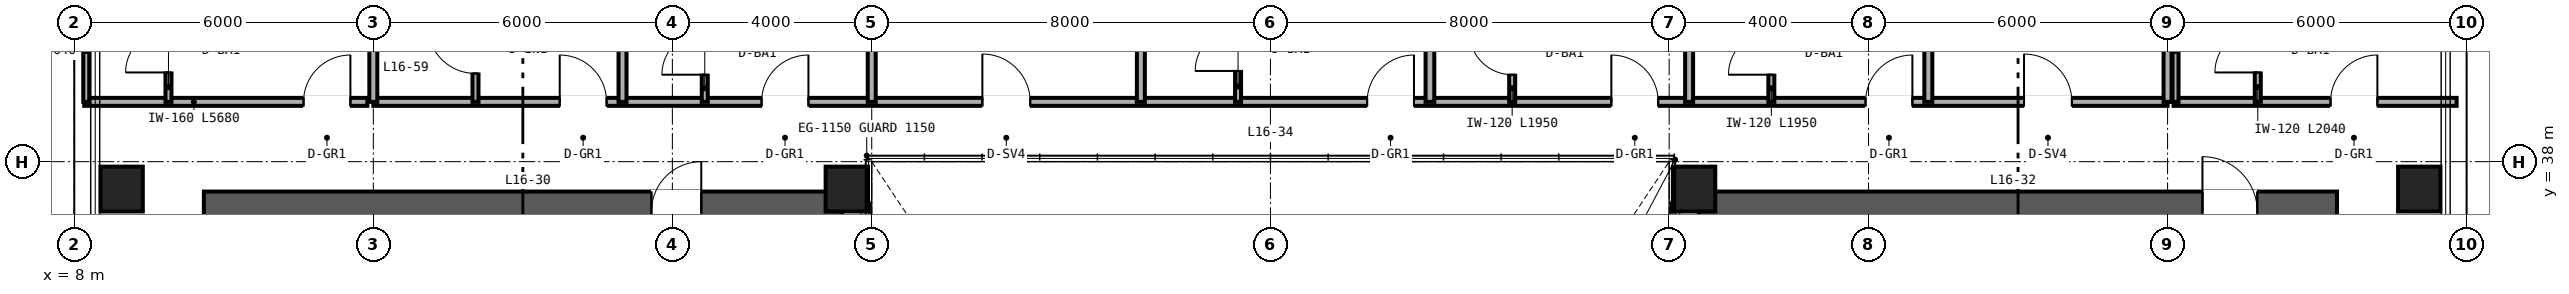
"""IFC4 building model, lengths in metres.
Left out: names, types, materials, properties, quantities, classifications, styles, units other than length and angle.
Written with IfcOpenShell. Run it as: python <this file> out.ifc"""

import sys

from ifc_helpers import new_model, si_unit, direction, frame, frame_2d, origin, origin_2d, place, context, subcontext, project, spatial, rectangle, hollow_rectangle, extrude, source, transform, mapped, element, fill, save


model = new_model("IFC4")
c1 = context("Model", 3, precision=1e-05, world=origin(), true_north=direction((0.0, 1.0)))
c2 = subcontext(c1, "Body", "Model", "MODEL_VIEW")
j1 = project(units=[si_unit("LENGTHUNIT", "METRE"), si_unit("PLANEANGLEUNIT", "RADIAN")], contexts=[c1])
p1 = place(None, origin())
s1 = spatial("IfcSite", under=j1, at=p1, CompositionType="ELEMENT")
p2 = place(p1, origin())
s2 = spatial("IfcBuilding", under=s1, at=p2, CompositionType="ELEMENT")
p3 = place(p2, frame((0.0, 0.0, 67.2)))
s3 = spatial("IfcBuildingStorey", under=s2, at=p3, CompositionType="ELEMENT", Elevation=67.2)
p4 = place(p3, frame((10.6, 37.0, 0.0), z_axis=(0.0, 0.0, 1.0), x_axis=(1.0, 0.0, 0.0)))
e1 = element("IfcWall", 1, at=p4, inside=s3, PredefinedType="SHEAR", context=c2, shape_type="SweptSolid", body=[
    extrude(rectangle(XDim=12.8, YDim=0.8, at=frame_2d((6.4, 0.0))), origin(), (0.0, 0.0, 1.0), 3.35),
])
p5 = place(p4, frame((8.98, 0.0, 0.0)))
e2 = element("IfcOpeningElement", 2, at=p5, cuts=e1, PredefinedType="OPENING", context=c2, shape_type="SweptSolid", body=[
    extrude(rectangle(XDim=1.0, YDim=2.15, at=frame_2d((0.5, 1.075))), frame((0.0, 0.41, 0.0), z_axis=(0.0, -1.0, 0.0), x_axis=(1.0, 0.0, 0.0)), (0.0, 0.0, 1.0), 0.82),
])
p6 = place(p3, frame((40.6, 37.0, 0.0), z_axis=(0.0, 0.0, 1.0), x_axis=(1.0, 0.0, 0.0)))
e3 = element("IfcWall", 3, at=p6, inside=s3, PredefinedType="SHEAR", context=c2, shape_type="SweptSolid", body=[
    extrude(rectangle(XDim=12.8, YDim=0.8, at=frame_2d((6.4, 0.0))), origin(), (0.0, 0.0, 1.0), 3.35),
])
p7 = place(p6, frame((10.1, 0.0, 0.0)))
e4 = element("IfcOpeningElement", 4, at=p7, cuts=e3, PredefinedType="OPENING", context=c2, shape_type="SweptSolid", body=[
    extrude(rectangle(XDim=1.1, YDim=2.15, at=frame_2d((0.55, 1.075))), frame((0.0, 0.41, 0.0), z_axis=(0.0, -1.0, 0.0), x_axis=(1.0, 0.0, 0.0)), (0.0, 0.0, 1.0), 0.82),
])
m1 = source(origin(), c2, "Body", "SweptSolid", [
    extrude(hollow_rectangle(XDim=0.85, YDim=0.9, WallThickness=0.04, at=origin_2d()), origin(), (0.0, 0.0, 1.0), 3.35),
])
for number, where, z_axis, x_axis in (
    (5, (8.95, 37.45, 0.0), (0.0, 0.0, 1.0), (1.0, 0.0, 0.0)),
    (6, (23.5, 37.45, 0.0), (0.0, 0.0, 1.0), (1.0, 0.0, 0.0)),
    (7, (40.5, 37.45, 0.0), (0.0, 0.0, 1.0), (1.0, 0.0, 0.0)),
    (8, (55.05, 37.45, 0.0), (0.0, 0.0, 1.0), (1.0, 0.0, 0.0)),
):
    element("IfcColumn", number, at=place(p3, frame(where, z_axis=z_axis, x_axis=x_axis)), inside=s3, PredefinedType="COLUMN", context=c2, shape_type="MappedRepresentation", body=[
        mapped(m1, transform((0.0, 0.0, 0.0), scale=1.0)),
    ])
p8 = place(p3, frame((8.2, 39.2, 0.0), z_axis=(0.0, 0.0, 1.0), x_axis=(1.0, 0.0, 0.0)))
e9 = element("IfcWall", 9, at=p8, inside=s3, PredefinedType="PARTITIONING", context=c2, shape_type="SweptSolid", body=[
    extrude(rectangle(XDim=5.68, YDim=0.16, at=frame_2d((2.84, 0.0))), origin(), (0.0, 0.0, 1.0), 3.35),
])
p9 = place(p8, frame((4.4, 0.0, 0.0)))
e10 = element("IfcOpeningElement", 10, at=p9, cuts=e9, PredefinedType="OPENING", context=c2, shape_type="SweptSolid", body=[
    extrude(rectangle(XDim=0.94, YDim=2.15, at=frame_2d((0.47, 1.075))), frame((0.0, 0.09, 0.0), z_axis=(0.0, -1.0, 0.0), x_axis=(1.0, 0.0, 0.0)), (0.0, 0.0, 1.0), 0.18),
])
p10 = place(p3, frame((9.89, 39.2, 0.0), z_axis=(0.0, 0.0, 1.0), x_axis=(0.0, 1.0, 0.0)))
e11 = element("IfcWall", 11, at=p10, inside=s3, PredefinedType="PARTITIONING", context=c2, shape_type="SweptSolid", body=[
    extrude(rectangle(XDim=2.04, YDim=0.12, at=frame_2d((1.02, 0.0))), origin(), (0.0, 0.0, 1.0), 3.35),
])
p11 = place(p10, frame((0.59, 0.0, 0.0)))
e12 = element("IfcOpeningElement", 12, at=p11, cuts=e11, PredefinedType="OPENING", context=c2, shape_type="SweptSolid", body=[
    extrude(rectangle(XDim=0.86, YDim=2.1, at=frame_2d((0.43, 1.05))), frame((0.0, 0.07, 0.0), z_axis=(0.0, -1.0, 0.0), x_axis=(1.0, 0.0, 0.0)), (0.0, 0.0, 1.0), 0.14),
])
p12 = place(p3, frame((8.24, 39.2, 0.0), z_axis=(0.0, 0.0, 1.0), x_axis=(0.0, 1.0, 0.0)))
e13 = element("IfcWall", 13, at=p12, inside=s3, PredefinedType="PARTITIONING", context=c2, shape_type="SweptSolid", body=[
    extrude(rectangle(XDim=2.04, YDim=0.12, at=frame_2d((1.02, 0.0))), origin(), (0.0, 0.0, 1.0), 3.35),
])
p13 = place(p3, frame((50.12, 39.2, 0.0), z_axis=(0.0, 0.0, 1.0), x_axis=(1.0, 0.0, 0.0)))
e14 = element("IfcWall", 14, at=p13, inside=s3, PredefinedType="PARTITIONING", context=c2, shape_type="SweptSolid", body=[
    extrude(rectangle(XDim=5.68, YDim=0.16, at=frame_2d((2.84, 0.0))), origin(), (0.0, 0.0, 1.0), 3.35),
])
p14 = place(p13, frame((3.15, 0.0, 0.0)))
e15 = element("IfcOpeningElement", 15, at=p14, cuts=e14, PredefinedType="OPENING", context=c2, shape_type="SweptSolid", body=[
    extrude(rectangle(XDim=0.94, YDim=2.15, at=frame_2d((0.47, 1.075))), frame((0.0, 0.09, 0.0), z_axis=(0.0, -1.0, 0.0), x_axis=(1.0, 0.0, 0.0)), (0.0, 0.0, 1.0), 0.18),
])
p15 = place(p3, frame((51.81, 39.2, 0.0), z_axis=(0.0, 0.0, 1.0), x_axis=(0.0, 1.0, 0.0)))
e16 = element("IfcWall", 16, at=p15, inside=s3, PredefinedType="PARTITIONING", context=c2, shape_type="SweptSolid", body=[
    extrude(rectangle(XDim=2.04, YDim=0.12, at=frame_2d((1.02, 0.0))), origin(), (0.0, 0.0, 1.0), 3.35),
])
p16 = place(p15, frame((0.59, 0.0, 0.0)))
e17 = element("IfcOpeningElement", 17, at=p16, cuts=e16, PredefinedType="OPENING", context=c2, shape_type="SweptSolid", body=[
    extrude(rectangle(XDim=0.86, YDim=2.1, at=frame_2d((0.43, 1.05))), frame((0.0, 0.07, 0.0), z_axis=(0.0, -1.0, 0.0), x_axis=(1.0, 0.0, 0.0)), (0.0, 0.0, 1.0), 0.14),
])
p17 = place(p3, frame((50.16, 39.2, 0.0), z_axis=(0.0, 0.0, 1.0), x_axis=(0.0, 1.0, 0.0)))
e18 = element("IfcWall", 18, at=p17, inside=s3, PredefinedType="PARTITIONING", context=c2, shape_type="SweptSolid", body=[
    extrude(rectangle(XDim=2.04, YDim=0.12, at=frame_2d((1.02, 0.0))), origin(), (0.0, 0.0, 1.0), 3.35),
])
p18 = place(p3, frame((14.0, 39.2, 0.0), z_axis=(0.0, 0.0, 1.0), x_axis=(1.0, 0.0, 0.0)))
e19 = element("IfcWall", 19, at=p18, inside=s3, PredefinedType="PARTITIONING", context=c2, shape_type="SweptSolid", body=[
    extrude(rectangle(XDim=36.0, YDim=0.16, at=frame_2d((18.0, 0.0))), origin(), (0.0, 0.0, 1.0), 2.571),
])
p19 = place(p18, frame((3.74, 0.0, 0.0)))
e20 = element("IfcOpeningElement", 20, at=p19, cuts=e19, PredefinedType="OPENING", context=c2, shape_type="SweptSolid", body=[
    extrude(rectangle(XDim=0.94, YDim=2.15, at=frame_2d((0.47, 1.075))), frame((0.0, 0.09, 0.0), z_axis=(0.0, -1.0, 0.0), x_axis=(1.0, 0.0, 0.0)), (0.0, 0.0, 1.0), 0.18),
])
p20 = place(p18, frame((7.79, 0.0, 0.0)))
e21 = element("IfcOpeningElement", 21, at=p20, cuts=e19, PredefinedType="OPENING", context=c2, shape_type="SweptSolid", body=[
    extrude(rectangle(XDim=0.94, YDim=2.15, at=frame_2d((0.47, 1.075))), frame((0.0, 0.09, 0.0), z_axis=(0.0, -1.0, 0.0), x_axis=(1.0, 0.0, 0.0)), (0.0, 0.0, 1.0), 0.18),
])
p21 = place(p18, frame((12.22, 0.0, 0.0)))
e22 = element("IfcOpeningElement", 22, at=p21, cuts=e19, PredefinedType="OPENING", context=c2, shape_type="SweptSolid", body=[
    extrude(rectangle(XDim=0.96, YDim=2.15, at=frame_2d((0.48, 1.075))), frame((0.0, 0.09, 0.0), z_axis=(0.0, -1.0, 0.0), x_axis=(1.0, 0.0, 0.0)), (0.0, 0.0, 1.0), 0.18),
])
p22 = place(p18, frame((19.94, 0.0, 0.0)))
e23 = element("IfcOpeningElement", 23, at=p22, cuts=e19, PredefinedType="OPENING", context=c2, shape_type="SweptSolid", body=[
    extrude(rectangle(XDim=0.94, YDim=2.15, at=frame_2d((0.47, 1.075))), frame((0.0, 0.09, 0.0), z_axis=(0.0, -1.0, 0.0), x_axis=(1.0, 0.0, 0.0)), (0.0, 0.0, 1.0), 0.18),
])
p23 = place(p18, frame((24.84, 0.0, 0.0)))
e24 = element("IfcOpeningElement", 24, at=p23, cuts=e19, PredefinedType="OPENING", context=c2, shape_type="SweptSolid", body=[
    extrude(rectangle(XDim=0.94, YDim=2.15, at=frame_2d((0.47, 1.075))), frame((0.0, 0.09, 0.0), z_axis=(0.0, -1.0, 0.0), x_axis=(1.0, 0.0, 0.0)), (0.0, 0.0, 1.0), 0.18),
])
p24 = place(p18, frame((29.94, 0.0, 0.0)))
e25 = element("IfcOpeningElement", 25, at=p24, cuts=e19, PredefinedType="OPENING", context=c2, shape_type="SweptSolid", body=[
    extrude(rectangle(XDim=0.94, YDim=2.15, at=frame_2d((0.47, 1.075))), frame((0.0, 0.09, 0.0), z_axis=(0.0, -1.0, 0.0), x_axis=(1.0, 0.0, 0.0)), (0.0, 0.0, 1.0), 0.18),
])
p25 = place(p18, frame((33.12, 0.0, 0.0)))
e26 = element("IfcOpeningElement", 26, at=p25, cuts=e19, PredefinedType="OPENING", context=c2, shape_type="SweptSolid", body=[
    extrude(rectangle(XDim=0.96, YDim=2.15, at=frame_2d((0.48, 1.075))), frame((0.0, 0.09, 0.0), z_axis=(0.0, -1.0, 0.0), x_axis=(1.0, 0.0, 0.0)), (0.0, 0.0, 1.0), 0.18),
])
for number, where, z_axis, x_axis in (
    (27, (14.0, 39.2, 0.0), (0.0, 0.0, 1.0), (0.0, 1.0, 0.0)),
    (28, (50.0, 39.2, 0.0), (0.0, 0.0, 1.0), (0.0, 1.0, 0.0)),
    (29, (19.0, 39.2, 0.0), (0.0, 0.0, 1.0), (0.0, 1.0, 0.0)),
):
    element("IfcWall", number, at=place(p3, frame(where, z_axis=z_axis, x_axis=x_axis)), inside=s3, PredefinedType="PARTITIONING", context=c2, shape_type="SweptSolid", body=[
        extrude(rectangle(XDim=10.44, YDim=0.16, at=frame_2d((5.22, 0.0))), origin(), (0.0, 0.0, 1.0), 2.657),
    ])
p26 = place(p3, frame((16.05, 39.2, 0.0), z_axis=(0.0, 0.0, 1.0), x_axis=(0.0, 1.0, 0.0)))
e30 = element("IfcWall", 30, at=p26, inside=s3, PredefinedType="PARTITIONING", context=c2, shape_type="SweptSolid", body=[
    extrude(rectangle(XDim=2.1, YDim=0.12, at=frame_2d((1.05, 0.0))), origin(), (0.0, 0.0, 1.0), 3.35),
])
p27 = place(p26, frame((0.57, 0.0, 0.0)))
e31 = element("IfcOpeningElement", 31, at=p27, cuts=e30, PredefinedType="OPENING", context=c2, shape_type="SweptSolid", body=[
    extrude(rectangle(XDim=0.96, YDim=2.15, at=frame_2d((0.48, 1.075))), frame((0.0, 0.07, 0.0), z_axis=(0.0, -1.0, 0.0), x_axis=(1.0, 0.0, 0.0)), (0.0, 0.0, 1.0), 0.14),
])
p28 = place(p3, frame((24.0, 39.2, 0.0), z_axis=(0.0, 0.0, 1.0), x_axis=(0.0, 1.0, 0.0)))
e32 = element("IfcWall", 32, at=p28, inside=s3, PredefinedType="PARTITIONING", context=c2, shape_type="SweptSolid", body=[
    extrude(rectangle(XDim=10.44, YDim=0.16, at=frame_2d((5.22, 0.0))), origin(), (0.0, 0.0, 1.0), 2.423),
])
p29 = place(p3, frame((20.65, 39.2, 0.0), z_axis=(0.0, 0.0, 1.0), x_axis=(0.0, 1.0, 0.0)))
e33 = element("IfcWall", 33, at=p29, inside=s3, PredefinedType="PARTITIONING", context=c2, shape_type="SweptSolid", body=[
    extrude(rectangle(XDim=1.95, YDim=0.12, at=frame_2d((0.975, 0.0))), origin(), (0.0, 0.0, 1.0), 3.35),
])
p30 = place(p29, frame((0.545, 0.0, 0.0)))
e34 = element("IfcOpeningElement", 34, at=p30, cuts=e33, PredefinedType="OPENING", context=c2, shape_type="SweptSolid", body=[
    extrude(rectangle(XDim=0.86, YDim=2.1, at=frame_2d((0.43, 1.05))), frame((0.0, 0.07, 0.0), z_axis=(0.0, -1.0, 0.0), x_axis=(1.0, 0.0, 0.0)), (0.0, 0.0, 1.0), 0.14),
])
p31 = place(p3, frame((29.4, 39.2, 0.0), z_axis=(0.0, 0.0, 1.0), x_axis=(0.0, 1.0, 0.0)))
e35 = element("IfcWall", 35, at=p31, inside=s3, PredefinedType="PARTITIONING", context=c2, shape_type="SweptSolid", body=[
    extrude(rectangle(XDim=10.44, YDim=0.16, at=frame_2d((5.22, 0.0))), origin(), (0.0, 0.0, 1.0), 2.423),
])
p32 = place(p3, frame((35.2, 39.2, 0.0), z_axis=(0.0, 0.0, 1.0), x_axis=(0.0, 1.0, 0.0)))
e36 = element("IfcWall", 36, at=p32, inside=s3, PredefinedType="PARTITIONING", context=c2, shape_type="SweptSolid", body=[
    extrude(rectangle(XDim=10.44, YDim=0.175, at=frame_2d((5.22, 0.0))), origin(), (0.0, 0.0, 1.0), 2.423),
])
p33 = place(p3, frame((31.35, 39.2, 0.0), z_axis=(0.0, 0.0, 1.0), x_axis=(0.0, 1.0, 0.0)))
e37 = element("IfcWall", 37, at=p33, inside=s3, PredefinedType="PARTITIONING", context=c2, shape_type="SweptSolid", body=[
    extrude(rectangle(XDim=2.1, YDim=0.12, at=frame_2d((1.05, 0.0))), origin(), (0.0, 0.0, 1.0), 3.35),
])
p34 = place(p33, frame((0.62, 0.0, 0.0)))
e38 = element("IfcOpeningElement", 38, at=p34, cuts=e37, PredefinedType="OPENING", context=c2, shape_type="SweptSolid", body=[
    extrude(rectangle(XDim=0.86, YDim=2.1, at=frame_2d((0.43, 1.05))), frame((0.0, 0.07, 0.0), z_axis=(0.0, -1.0, 0.0), x_axis=(1.0, 0.0, 0.0)), (0.0, 0.0, 1.0), 0.14),
])
p35 = place(p3, frame((40.4, 39.2, 0.0), z_axis=(0.0, 0.0, 1.0), x_axis=(0.0, 1.0, 0.0)))
e39 = element("IfcWall", 39, at=p35, inside=s3, PredefinedType="PARTITIONING", context=c2, shape_type="SweptSolid", body=[
    extrude(rectangle(XDim=10.44, YDim=0.16, at=frame_2d((5.22, 0.0))), origin(), (0.0, 0.0, 1.0), 2.423),
])
p36 = place(p3, frame((36.85, 39.2, 0.0), z_axis=(0.0, 0.0, 1.0), x_axis=(0.0, 1.0, 0.0)))
e40 = element("IfcWall", 40, at=p36, inside=s3, PredefinedType="PARTITIONING", context=c2, shape_type="SweptSolid", body=[
    extrude(rectangle(XDim=1.95, YDim=0.12, at=frame_2d((0.975, 0.0))), origin(), (0.0, 0.0, 1.0), 3.35),
])
p37 = place(p36, frame((0.545, 0.0, 0.0)))
e41 = element("IfcOpeningElement", 41, at=p37, cuts=e40, PredefinedType="OPENING", context=c2, shape_type="SweptSolid", body=[
    extrude(rectangle(XDim=0.86, YDim=2.1, at=frame_2d((0.43, 1.05))), frame((0.0, 0.07, 0.0), z_axis=(0.0, -1.0, 0.0), x_axis=(1.0, 0.0, 0.0)), (0.0, 0.0, 1.0), 0.14),
])
p38 = place(p3, frame((45.2, 39.2, 0.0), z_axis=(0.0, 0.0, 1.0), x_axis=(0.0, 1.0, 0.0)))
e42 = element("IfcWall", 42, at=p38, inside=s3, PredefinedType="PARTITIONING", context=c2, shape_type="SweptSolid", body=[
    extrude(rectangle(XDim=10.44, YDim=0.16, at=frame_2d((5.22, 0.0))), origin(), (0.0, 0.0, 1.0), 2.657),
])
p39 = place(p3, frame((42.05, 39.2, 0.0), z_axis=(0.0, 0.0, 1.0), x_axis=(0.0, 1.0, 0.0)))
e43 = element("IfcWall", 43, at=p39, inside=s3, PredefinedType="PARTITIONING", context=c2, shape_type="SweptSolid", body=[
    extrude(rectangle(XDim=1.95, YDim=0.12, at=frame_2d((0.975, 0.0))), origin(), (0.0, 0.0, 1.0), 3.35),
])
p40 = place(p39, frame((0.545, 0.0, 0.0)))
e44 = element("IfcOpeningElement", 44, at=p40, cuts=e43, PredefinedType="OPENING", context=c2, shape_type="SweptSolid", body=[
    extrude(rectangle(XDim=0.86, YDim=2.1, at=frame_2d((0.43, 1.05))), frame((0.0, 0.07, 0.0), z_axis=(0.0, -1.0, 0.0), x_axis=(1.0, 0.0, 0.0)), (0.0, 0.0, 1.0), 0.14),
])
m2 = source(origin(), c2, "Body", "SweptSolid", [
    extrude(rectangle(XDim=1.0, YDim=2.15, at=frame_2d((0.5, 1.075))), frame((0.0, 0.025, 0.0), z_axis=(0.0, -1.0, 0.0), x_axis=(1.0, 0.0, 0.0)), (0.0, 0.0, 1.0), 0.05),
])
p41 = place(p5, origin())
e45 = element("IfcDoor", 45, at=p41, inside=s3, OperationType="SINGLE_SWING_RIGHT", PredefinedType="DOOR", context=c2, shape_type="MappedRepresentation", body=[
    mapped(m2, transform((0.0, 0.0, 0.0), scale=1.0)),
])
fill(e2, e45)
m3 = source(origin(), c2, "Body", "SweptSolid", [
    extrude(rectangle(XDim=1.1, YDim=2.15, at=frame_2d((0.55, 1.075))), frame((0.0, 0.025, 0.0), z_axis=(0.0, -1.0, 0.0), x_axis=(1.0, 0.0, 0.0)), (0.0, 0.0, 1.0), 0.05),
])
p42 = place(p7, origin())
e46 = element("IfcDoor", 46, at=p42, inside=s3, OperationType="SINGLE_SWING_LEFT", PredefinedType="DOOR", context=c2, shape_type="MappedRepresentation", body=[
    mapped(m3, transform((0.0, 0.0, 0.0), scale=1.0)),
])
fill(e4, e46)
m4 = source(origin(), c2, "Body", "SweptSolid", [
    extrude(rectangle(XDim=0.86, YDim=2.1, at=frame_2d((0.43, 1.05))), frame((0.0, 0.025, 0.0), z_axis=(0.0, -1.0, 0.0), x_axis=(1.0, 0.0, 0.0)), (0.0, 0.0, 1.0), 0.05),
])
p43 = place(p11, origin())
e47 = element("IfcDoor", 47, at=p43, inside=s3, OperationType="SINGLE_SWING_LEFT", PredefinedType="DOOR", context=c2, shape_type="MappedRepresentation", body=[
    mapped(m4, transform((0.0, 0.0, 0.0), scale=1.0)),
])
fill(e12, e47)
m5 = source(origin(), c2, "Body", "SweptSolid", [
    extrude(rectangle(XDim=0.94, YDim=2.15, at=frame_2d((0.47, 1.075))), frame((0.0, 0.025, 0.0), z_axis=(0.0, -1.0, 0.0), x_axis=(1.0, 0.0, 0.0)), (0.0, 0.0, 1.0), 0.05),
])
p44 = place(p9, origin())
e48 = element("IfcDoor", 48, at=p44, inside=s3, OperationType="SINGLE_SWING_RIGHT", PredefinedType="DOOR", context=c2, shape_type="MappedRepresentation", body=[
    mapped(m5, transform((0.0, 0.0, 0.0), scale=1.0)),
])
fill(e10, e48)
p45 = place(p16, origin())
e49 = element("IfcDoor", 49, at=p45, inside=s3, OperationType="SINGLE_SWING_LEFT", PredefinedType="DOOR", context=c2, shape_type="MappedRepresentation", body=[
    mapped(m4, transform((0.0, 0.0, 0.0), scale=1.0)),
])
fill(e17, e49)
p46 = place(p14, origin())
e50 = element("IfcDoor", 50, at=p46, inside=s3, OperationType="SINGLE_SWING_RIGHT", PredefinedType="DOOR", context=c2, shape_type="MappedRepresentation", body=[
    mapped(m5, transform((0.0, 0.0, 0.0), scale=1.0)),
])
fill(e15, e50)
m6 = source(origin(), c2, "Body", "SweptSolid", [
    extrude(rectangle(XDim=0.96, YDim=2.15, at=frame_2d((0.48, 1.075))), frame((0.0, 0.025, 0.0), z_axis=(0.0, -1.0, 0.0), x_axis=(1.0, 0.0, 0.0)), (0.0, 0.0, 1.0), 0.05),
])
p47 = place(p27, origin())
e51 = element("IfcDoor", 51, at=p47, inside=s3, OperationType="SINGLE_SWING_RIGHT", PredefinedType="DOOR", context=c2, shape_type="MappedRepresentation", body=[
    mapped(m6, transform((0.0, 0.0, 0.0), scale=1.0)),
])
fill(e31, e51)
p48 = place(p30, origin())
e52 = element("IfcDoor", 52, at=p48, inside=s3, OperationType="SINGLE_SWING_LEFT", PredefinedType="DOOR", context=c2, shape_type="MappedRepresentation", body=[
    mapped(m4, transform((0.0, 0.0, 0.0), scale=1.0)),
])
fill(e34, e52)
p49 = place(p34, origin())
e53 = element("IfcDoor", 53, at=p49, inside=s3, OperationType="SINGLE_SWING_LEFT", PredefinedType="DOOR", context=c2, shape_type="MappedRepresentation", body=[
    mapped(m4, transform((0.0, 0.0, 0.0), scale=1.0)),
])
fill(e38, e53)
p50 = place(p37, origin())
e54 = element("IfcDoor", 54, at=p50, inside=s3, OperationType="SINGLE_SWING_RIGHT", PredefinedType="DOOR", context=c2, shape_type="MappedRepresentation", body=[
    mapped(m4, transform((0.0, 0.0, 0.0), scale=1.0)),
])
fill(e41, e54)
p51 = place(p40, origin())
e55 = element("IfcDoor", 55, at=p51, inside=s3, OperationType="SINGLE_SWING_LEFT", PredefinedType="DOOR", context=c2, shape_type="MappedRepresentation", body=[
    mapped(m4, transform((0.0, 0.0, 0.0), scale=1.0)),
])
fill(e44, e55)
p52 = place(p19, origin())
e56 = element("IfcDoor", 56, at=p52, inside=s3, OperationType="SINGLE_SWING_LEFT", PredefinedType="DOOR", context=c2, shape_type="MappedRepresentation", body=[
    mapped(m5, transform((0.0, 0.0, 0.0), scale=1.0)),
])
fill(e20, e56)
p53 = place(p20, origin())
e57 = element("IfcDoor", 57, at=p53, inside=s3, OperationType="SINGLE_SWING_RIGHT", PredefinedType="DOOR", context=c2, shape_type="MappedRepresentation", body=[
    mapped(m5, transform((0.0, 0.0, 0.0), scale=1.0)),
])
fill(e21, e57)
p54 = place(p21, origin())
e58 = element("IfcDoor", 58, at=p54, inside=s3, OperationType="SINGLE_SWING_LEFT", PredefinedType="DOOR", context=c2, shape_type="MappedRepresentation", body=[
    mapped(m6, transform((0.0, 0.0, 0.0), scale=1.0)),
])
fill(e22, e58)
p55 = place(p22, origin())
e59 = element("IfcDoor", 59, at=p55, inside=s3, OperationType="SINGLE_SWING_RIGHT", PredefinedType="DOOR", context=c2, shape_type="MappedRepresentation", body=[
    mapped(m5, transform((0.0, 0.0, 0.0), scale=1.0)),
])
fill(e23, e59)
p56 = place(p23, origin())
e60 = element("IfcDoor", 60, at=p56, inside=s3, OperationType="SINGLE_SWING_LEFT", PredefinedType="DOOR", context=c2, shape_type="MappedRepresentation", body=[
    mapped(m5, transform((0.0, 0.0, 0.0), scale=1.0)),
])
fill(e24, e60)
p57 = place(p24, origin())
e61 = element("IfcDoor", 61, at=p57, inside=s3, OperationType="SINGLE_SWING_RIGHT", PredefinedType="DOOR", context=c2, shape_type="MappedRepresentation", body=[
    mapped(m5, transform((0.0, 0.0, 0.0), scale=1.0)),
])
fill(e25, e61)
p58 = place(p25, origin())
e62 = element("IfcDoor", 62, at=p58, inside=s3, OperationType="SINGLE_SWING_LEFT", PredefinedType="DOOR", context=c2, shape_type="MappedRepresentation", body=[
    mapped(m6, transform((0.0, 0.0, 0.0), scale=1.0)),
])
fill(e26, e62)
save(model, sys.argv[1])
